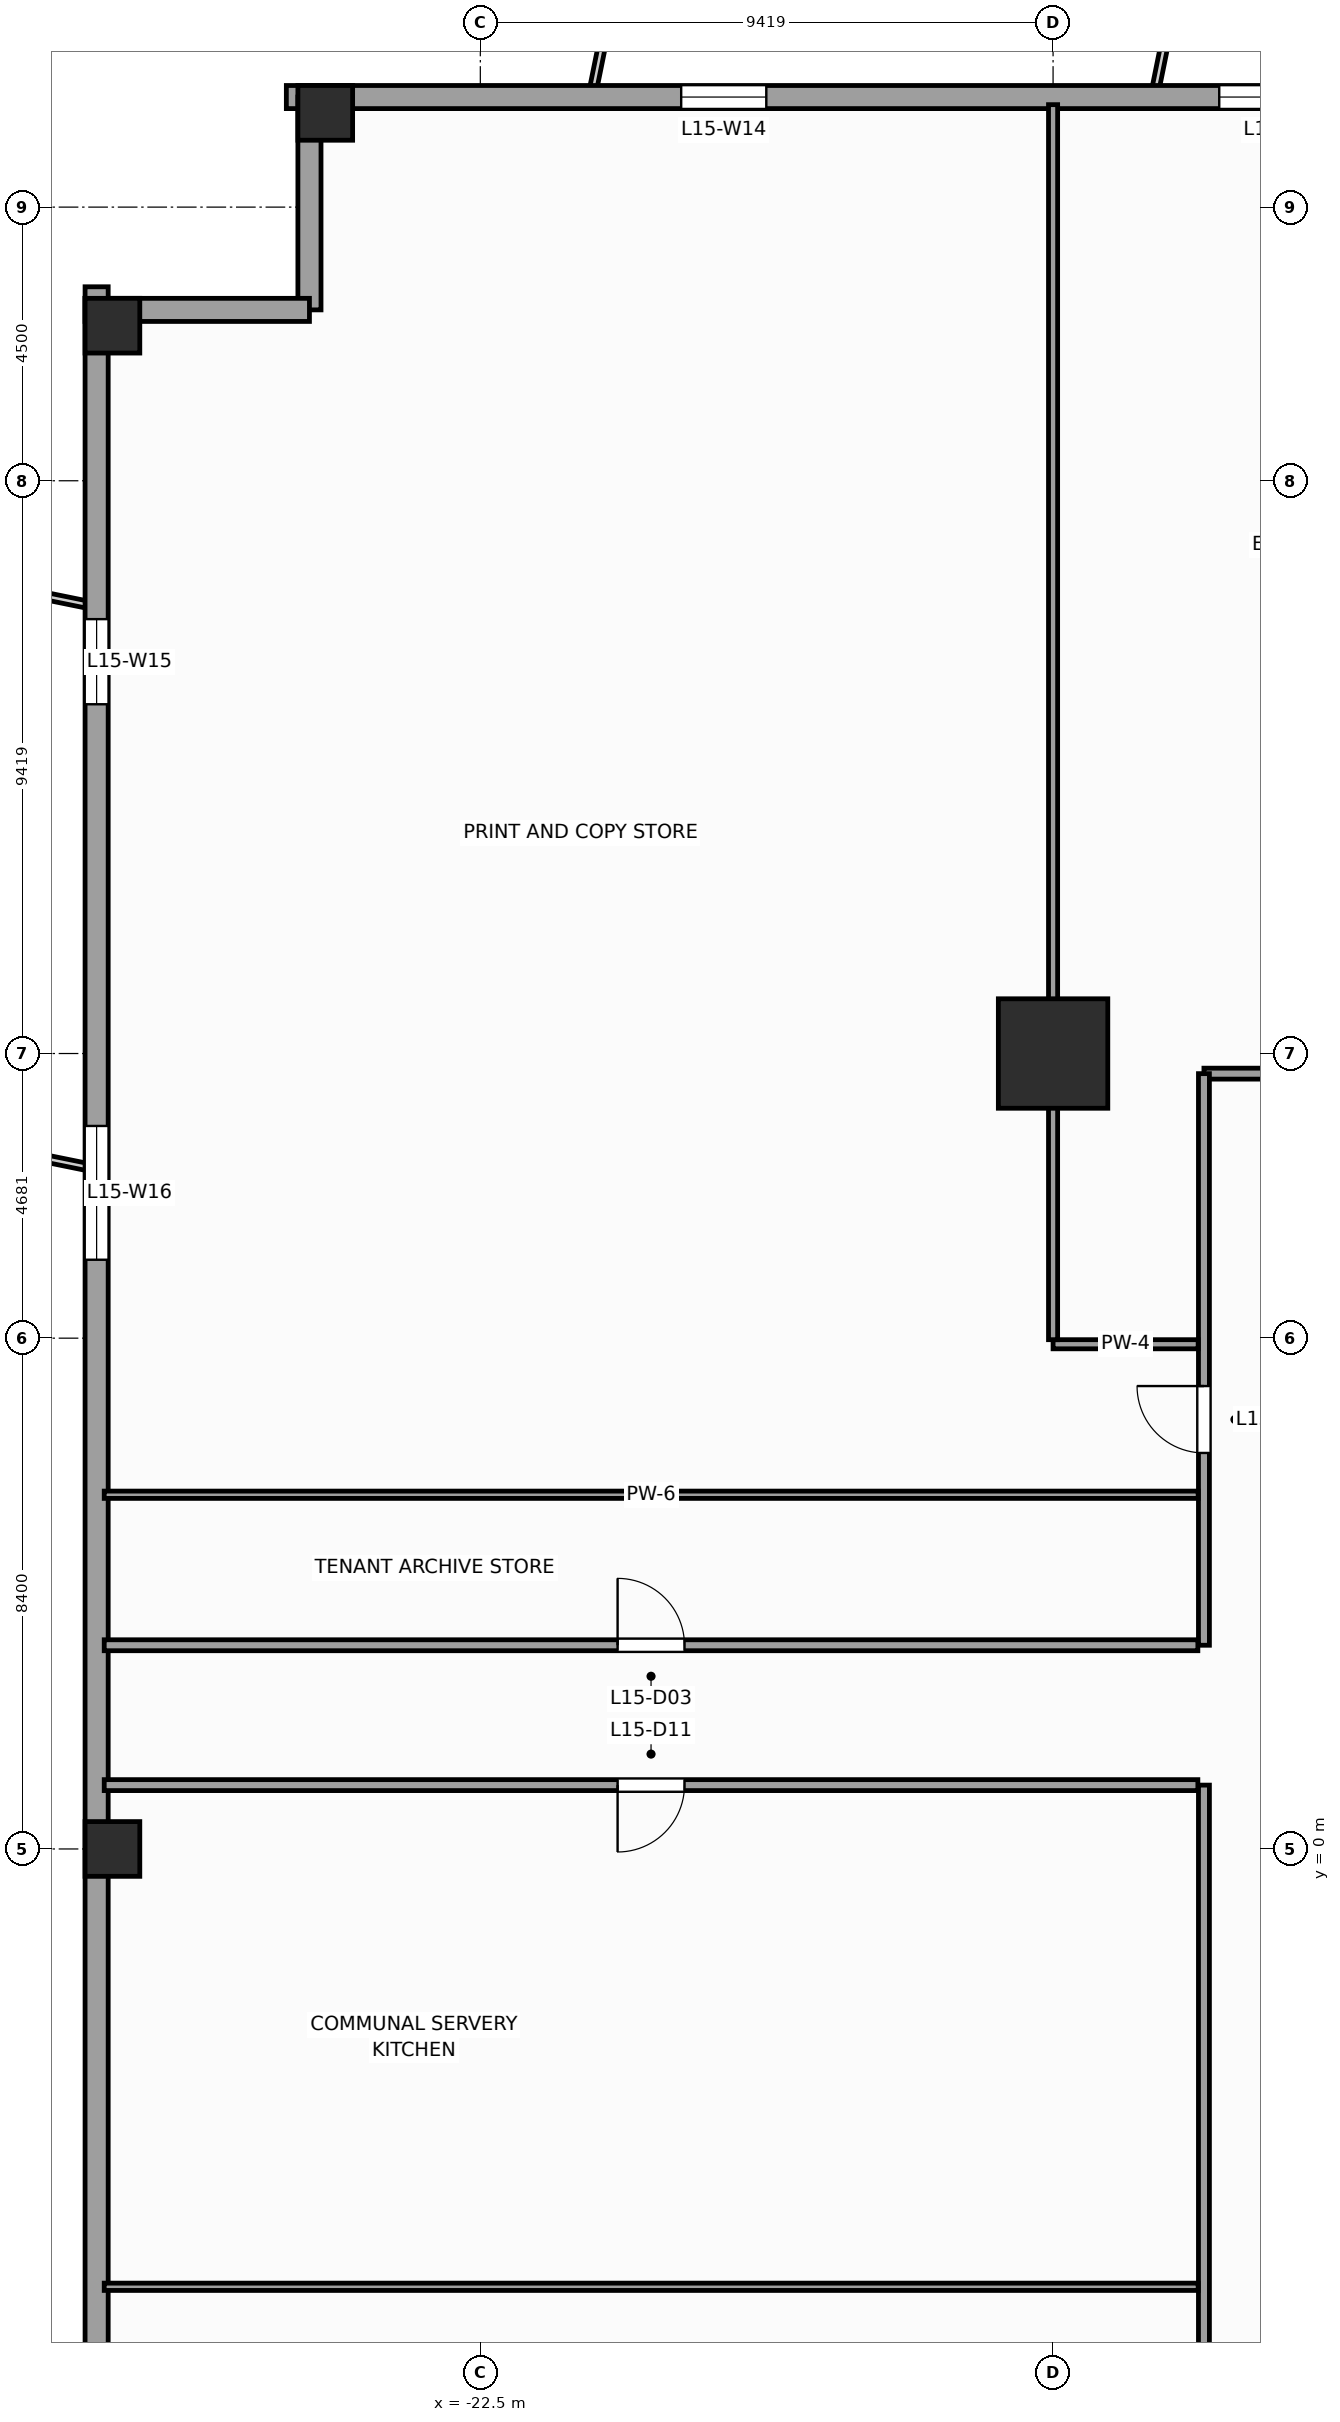
"""IFC4 building model, lengths in metres.
Left out: names, types, materials, properties, quantities, classifications, styles, units other than length and angle.
Written with IfcOpenShell. Run it as: python <this file> out.ifc"""

import sys

from ifc_helpers import new_model, si_unit, direction, frame, frame_2d, origin, origin_2d, place, context, subcontext, project, spatial, rectangle, extrude, source, transform, mapped, element, fill, save


model = new_model("IFC4")
c1 = context("Model", 3, precision=1e-05, world=origin(), true_north=direction((0.0, 1.0)))
c2 = subcontext(c1, "Body", "Model", "MODEL_VIEW")
j1 = project(units=[si_unit("LENGTHUNIT", "METRE"), si_unit("PLANEANGLEUNIT", "RADIAN")], contexts=[c1])
p1 = place(None, origin())
s1 = spatial("IfcSite", under=j1, at=p1, CompositionType="ELEMENT")
p2 = place(p1, origin())
s2 = spatial("IfcBuilding", under=s1, at=p2, CompositionType="ELEMENT")
p3 = place(p2, frame((0.0, 0.0, 66.0)))
s3 = spatial("IfcBuildingStorey", under=s2, at=p3, CompositionType="ELEMENT", Elevation=66.0)
m1 = source(origin(), c2, "Body", "SweptSolid", [
    extrude(rectangle(XDim=1.8, YDim=1.8, at=origin_2d()), origin(), (0.0, 0.0, 1.0), 4.0),
])
p4 = place(p3, frame((-13.081, 13.081, 0.0), z_axis=(0.0, 0.0, 1.0), x_axis=(1.0, 0.0, 0.0)))
e1 = element("IfcColumn", 1, at=p4, inside=s3, PredefinedType="COLUMN", context=c2, shape_type="MappedRepresentation", body=[
    mapped(m1, transform((0.0, 0.0, 0.0), scale=1.0)),
])
m2 = source(origin(), c2, "Body", "SweptSolid", [
    extrude(rectangle(XDim=0.9, YDim=0.9, at=origin_2d()), origin(), (0.0, 0.0, 1.0), 4.0),
])
for number, where, z_axis, x_axis in (
    (2, (-25.05, 28.55, 0.0), (0.0, 0.0, 1.0), (1.0, 0.0, 0.0)),
    (3, (-28.55, 25.05, 0.0), (0.0, 0.0, 1.0), (1.0, 0.0, 0.0)),
    (4, (-28.55, 0.0, 0.0), (0.0, 0.0, 1.0), (1.0, 0.0, 0.0)),
):
    element("IfcColumn", number, at=place(p3, frame(where, z_axis=z_axis, x_axis=x_axis)), inside=s3, PredefinedType="COLUMN", context=c2, shape_type="MappedRepresentation", body=[
        mapped(m2, transform((0.0, 0.0, 0.0), scale=1.0)),
    ])
p5 = place(p3, frame((25.69, 28.81, 0.0), z_axis=(0.0, 0.0, 1.0), x_axis=(-1.0, 0.0, 0.0)))
e5 = element("IfcWall", 5, at=p5, inside=s3, PredefinedType="STANDARD", context=c2, shape_type="SweptSolid", body=[
    extrude(rectangle(XDim=51.38, YDim=0.38, at=frame_2d((25.69, 0.0))), origin(), (0.0, 0.0, 1.0), 3.12),
])
p6 = place(p5, frame((18.715, 0.0, 0.0)))
e6 = element("IfcOpeningElement", 6, at=p6, cuts=e5, PredefinedType="OPENING", context=c2, shape_type="SweptSolid", body=[
    extrude(rectangle(XDim=1.05, YDim=2.25, at=frame_2d((0.525, 1.125))), frame((0.0, 0.2, 0.0), z_axis=(0.0, -1.0, 0.0), x_axis=(1.0, 0.0, 0.0)), (0.0, 0.0, 1.0), 0.4),
])
p7 = place(p5, frame((5.466, 0.0, 0.49)))
e7 = element("IfcOpeningElement", 7, at=p7, cuts=e5, PredefinedType="OPENING", context=c2, shape_type="SweptSolid", body=[
    extrude(rectangle(XDim=1.4, YDim=2.4, at=frame_2d((0.7, 1.2))), frame((0.0, 0.2, 0.0), z_axis=(0.0, -1.0, 0.0), x_axis=(1.0, 0.0, 0.0)), (0.0, 0.0, 1.0), 0.4),
])
p8 = place(p5, frame((13.8, 0.0, 0.49)))
e8 = element("IfcOpeningElement", 8, at=p8, cuts=e5, PredefinedType="OPENING", context=c2, shape_type="SweptSolid", body=[
    extrude(rectangle(XDim=2.2, YDim=2.4, at=frame_2d((1.1, 1.2))), frame((0.0, 0.2, 0.0), z_axis=(0.0, -1.0, 0.0), x_axis=(1.0, 0.0, 0.0)), (0.0, 0.0, 1.0), 0.4),
])
p9 = place(p5, frame((22.062, 0.0, 0.49)))
e9 = element("IfcOpeningElement", 9, at=p9, cuts=e5, PredefinedType="OPENING", context=c2, shape_type="SweptSolid", body=[
    extrude(rectangle(XDim=2.2, YDim=2.4, at=frame_2d((1.1, 1.2))), frame((0.0, 0.2, 0.0), z_axis=(0.0, -1.0, 0.0), x_axis=(1.0, 0.0, 0.0)), (0.0, 0.0, 1.0), 0.4),
])
p10 = place(p5, frame((33.838, 0.0, 0.49)))
e10 = element("IfcOpeningElement", 10, at=p10, cuts=e5, PredefinedType="OPENING", context=c2, shape_type="SweptSolid", body=[
    extrude(rectangle(XDim=2.2, YDim=2.4, at=frame_2d((1.1, 1.2))), frame((0.0, 0.2, 0.0), z_axis=(0.0, -1.0, 0.0), x_axis=(1.0, 0.0, 0.0)), (0.0, 0.0, 1.0), 0.4),
])
p11 = place(p5, frame((43.487, 0.0, 0.49)))
e11 = element("IfcOpeningElement", 11, at=p11, cuts=e5, PredefinedType="OPENING", context=c2, shape_type="SweptSolid", body=[
    extrude(rectangle(XDim=1.4, YDim=2.4, at=frame_2d((0.7, 1.2))), frame((0.0, 0.2, 0.0), z_axis=(0.0, -1.0, 0.0), x_axis=(1.0, 0.0, 0.0)), (0.0, 0.0, 1.0), 0.4),
])
p12 = place(p3, frame((-25.31, 28.81, 0.0), z_axis=(0.0, 0.0, 1.0), x_axis=(0.0, -1.0, 0.0)))
e12 = element("IfcWall", 12, at=p12, inside=s3, PredefinedType="STANDARD", context=c2, shape_type="SweptSolid", body=[
    extrude(rectangle(XDim=3.5, YDim=0.38, at=frame_2d((1.75, 0.0))), origin(), (0.0, 0.0, 1.0), 3.72),
])
p13 = place(p3, frame((-25.31, 25.31, 0.0), z_axis=(0.0, 0.0, 1.0), x_axis=(-1.0, 0.0, 0.0)))
e13 = element("IfcWall", 13, at=p13, inside=s3, PredefinedType="STANDARD", context=c2, shape_type="SweptSolid", body=[
    extrude(rectangle(XDim=3.69, YDim=0.38, at=frame_2d((1.845, 0.0))), origin(), (0.0, 0.0, 1.0), 3.72),
])
p14 = place(p3, frame((-28.81, 25.69, 0.0), z_axis=(0.0, 0.0, 1.0), x_axis=(0.0, -1.0, 0.0)))
e14 = element("IfcWall", 14, at=p14, inside=s3, PredefinedType="STANDARD", context=c2, shape_type="SweptSolid", body=[
    extrude(rectangle(XDim=51.38, YDim=0.38, at=frame_2d((25.69, 0.0))), origin(), (0.0, 0.0, 1.0), 3.12),
])
p15 = place(p14, frame((5.466, 0.0, 0.49)))
e15 = element("IfcOpeningElement", 15, at=p15, cuts=e14, PredefinedType="OPENING", context=c2, shape_type="SweptSolid", body=[
    extrude(rectangle(XDim=1.4, YDim=2.4, at=frame_2d((0.7, 1.2))), frame((0.0, 0.2, 0.0), z_axis=(0.0, -1.0, 0.0), x_axis=(1.0, 0.0, 0.0)), (0.0, 0.0, 1.0), 0.4),
])
p16 = place(p14, frame((13.8, 0.0, 0.49)))
e16 = element("IfcOpeningElement", 16, at=p16, cuts=e14, PredefinedType="OPENING", context=c2, shape_type="SweptSolid", body=[
    extrude(rectangle(XDim=2.2, YDim=2.4, at=frame_2d((1.1, 1.2))), frame((0.0, 0.2, 0.0), z_axis=(0.0, -1.0, 0.0), x_axis=(1.0, 0.0, 0.0)), (0.0, 0.0, 1.0), 0.4),
])
p17 = place(p14, frame((33.838, 0.0, 0.49)))
e17 = element("IfcOpeningElement", 17, at=p17, cuts=e14, PredefinedType="OPENING", context=c2, shape_type="SweptSolid", body=[
    extrude(rectangle(XDim=2.2, YDim=2.4, at=frame_2d((1.1, 1.2))), frame((0.0, 0.2, 0.0), z_axis=(0.0, -1.0, 0.0), x_axis=(1.0, 0.0, 0.0)), (0.0, 0.0, 1.0), 0.4),
])
p18 = place(p14, frame((43.487, 0.0, 0.49)))
e18 = element("IfcOpeningElement", 18, at=p18, cuts=e14, PredefinedType="OPENING", context=c2, shape_type="SweptSolid", body=[
    extrude(rectangle(XDim=1.4, YDim=2.4, at=frame_2d((0.7, 1.2))), frame((0.0, 0.2, 0.0), z_axis=(0.0, -1.0, 0.0), x_axis=(1.0, 0.0, 0.0)), (0.0, 0.0, 1.0), 0.4),
])
p19 = place(p3, frame((-10.6, 12.75, 0.0), z_axis=(0.0, 0.0, 1.0), x_axis=(1.0, 0.0, 0.0)))
e19 = element("IfcWall", 19, at=p19, inside=s3, PredefinedType="PARTITIONING", context=c2, shape_type="SweptSolid", body=[
    extrude(rectangle(XDim=21.2, YDim=0.18, at=frame_2d((10.6, 0.0))), origin(), (0.0, 0.0, 1.0), 3.72),
])
p20 = place(p19, frame((16.636, 0.0, 0.0)))
e20 = element("IfcOpeningElement", 20, at=p20, cuts=e19, PredefinedType="OPENING", context=c2, shape_type="SweptSolid", body=[
    extrude(rectangle(XDim=0.95, YDim=2.1, at=frame_2d((0.475, 1.05))), frame((0.0, 0.1, 0.0), z_axis=(0.0, -1.0, 0.0), x_axis=(1.0, 0.0, 0.0)), (0.0, 0.0, 1.0), 0.2),
])
p21 = place(p19, frame((3.314, 0.0, 0.0)))
e21 = element("IfcOpeningElement", 21, at=p21, cuts=e19, PredefinedType="OPENING", context=c2, shape_type="SweptSolid", body=[
    extrude(rectangle(XDim=1.1, YDim=2.2, at=frame_2d((0.55, 1.1))), frame((0.0, 0.1, 0.0), z_axis=(0.0, -1.0, 0.0), x_axis=(1.0, 0.0, 0.0)), (0.0, 0.0, 1.0), 0.2),
])
p22 = place(p19, frame((11.05, 0.0, 0.0)))
e22 = element("IfcOpeningElement", 22, at=p22, cuts=e19, PredefinedType="OPENING", context=c2, shape_type="SweptSolid", body=[
    extrude(rectangle(XDim=1.1, YDim=2.2, at=frame_2d((0.55, 1.1))), frame((0.0, 0.1, 0.0), z_axis=(0.0, -1.0, 0.0), x_axis=(1.0, 0.0, 0.0)), (0.0, 0.0, 1.0), 0.2),
])
p23 = place(p3, frame((-10.6, -11.7, 0.0), z_axis=(0.0, 0.0, 1.0), x_axis=(0.0, 1.0, 0.0)))
e23 = element("IfcWall", 23, at=p23, inside=s3, PredefinedType="PARTITIONING", context=c2, shape_type="SweptSolid", body=[
    extrude(rectangle(XDim=12.75, YDim=0.18, at=frame_2d((6.375, 0.0))), origin(), (0.0, 0.0, 1.0), 3.72),
])
p24 = place(p3, frame((-10.6, 3.35, 0.0), z_axis=(0.0, 0.0, 1.0), x_axis=(0.0, 1.0, 0.0)))
e24 = element("IfcWall", 24, at=p24, inside=s3, PredefinedType="PARTITIONING", context=c2, shape_type="SweptSolid", body=[
    extrude(rectangle(XDim=9.4, YDim=0.18, at=frame_2d((4.7, 0.0))), origin(), (0.0, 0.0, 1.0), 3.72),
])
p25 = place(p24, frame((3.163, 0.0, 0.0)))
e25 = element("IfcOpeningElement", 25, at=p25, cuts=e24, PredefinedType="OPENING", context=c2, shape_type="SweptSolid", body=[
    extrude(rectangle(XDim=1.1, YDim=2.2, at=frame_2d((0.55, 1.1))), frame((0.0, 0.1, 0.0), z_axis=(0.0, -1.0, 0.0), x_axis=(1.0, 0.0, 0.0)), (0.0, 0.0, 1.0), 0.2),
])
p26 = place(p3, frame((-28.685, 1.05, 0.0), z_axis=(0.0, 0.0, 1.0), x_axis=(1.0, 0.0, 0.0)))
e26 = element("IfcWall", 26, at=p26, inside=s3, PredefinedType="PARTITIONING", context=c2, shape_type="SweptSolid", body=[
    extrude(rectangle(XDim=17.985, YDim=0.18, at=frame_2d((8.993, 0.0))), origin(), (0.0, 0.0, 1.0), 3.72),
])
p27 = place(p26, frame((8.442, 0.0, 0.0)))
e27 = element("IfcOpeningElement", 27, at=p27, cuts=e26, PredefinedType="OPENING", context=c2, shape_type="SweptSolid", body=[
    extrude(rectangle(XDim=1.1, YDim=2.2, at=frame_2d((0.55, 1.1))), frame((0.0, 0.1, 0.0), z_axis=(0.0, -1.0, 0.0), x_axis=(1.0, 0.0, 0.0)), (0.0, 0.0, 1.0), 0.2),
])
p28 = place(p3, frame((-28.685, 3.35, 0.0), z_axis=(0.0, 0.0, 1.0), x_axis=(1.0, 0.0, 0.0)))
e28 = element("IfcWall", 28, at=p28, inside=s3, PredefinedType="PARTITIONING", context=c2, shape_type="SweptSolid", body=[
    extrude(rectangle(XDim=17.985, YDim=0.18, at=frame_2d((8.993, 0.0))), origin(), (0.0, 0.0, 1.0), 3.72),
])
p29 = place(p28, frame((8.442, 0.0, 0.0)))
e29 = element("IfcOpeningElement", 29, at=p29, cuts=e28, PredefinedType="OPENING", context=c2, shape_type="SweptSolid", body=[
    extrude(rectangle(XDim=1.1, YDim=2.2, at=frame_2d((0.55, 1.1))), frame((0.0, 0.1, 0.0), z_axis=(0.0, -1.0, 0.0), x_axis=(1.0, 0.0, 0.0)), (0.0, 0.0, 1.0), 0.2),
])
p30 = place(p3, frame((-10.695, 8.3, 0.0), z_axis=(0.0, 0.0, 1.0), x_axis=(-1.0, 0.0, 0.0)))
e30 = element("IfcWall", 30, at=p30, inside=s3, PredefinedType="PARTITIONING", context=c2, shape_type="SweptSolid", body=[
    extrude(rectangle(XDim=2.386, YDim=0.15, at=frame_2d((1.193, 0.0))), origin(), (0.0, 0.0, 1.0), 3.72),
])
p31 = place(p3, frame((-13.081, 8.375, 0.0), z_axis=(0.0, 0.0, 1.0), x_axis=(0.0, 1.0, 0.0)))
e31 = element("IfcWall", 31, at=p31, inside=s3, PredefinedType="PARTITIONING", context=c2, shape_type="SweptSolid", body=[
    extrude(rectangle(XDim=20.31, YDim=0.15, at=frame_2d((10.155, 0.0))), origin(), (0.0, 0.0, 1.0), 2.712),
])
for number, where, z_axis, x_axis in (
    (32, (-28.685, 5.825, 0.0), (0.0, 0.0, 1.0), (1.0, 0.0, 0.0)),
    (33, (-28.685, -7.2, 0.0), (0.0, 0.0, 1.0), (1.0, 0.0, 0.0)),
):
    element("IfcWall", number, at=place(p3, frame(where, z_axis=z_axis, x_axis=x_axis)), inside=s3, PredefinedType="PARTITIONING", context=c2, shape_type="SweptSolid", body=[
        extrude(rectangle(XDim=17.99, YDim=0.12, at=frame_2d((8.995, 0.0))), origin(), (0.0, 0.0, 1.0), 3.72),
    ])
m3 = source(origin(), c2, "Body", "SweptSolid", [
    extrude(rectangle(XDim=2.2, YDim=2.4, at=frame_2d((1.1, 1.2))), frame((0.0, 0.03, 0.0), z_axis=(0.0, -1.0, 0.0), x_axis=(1.0, 0.0, 0.0)), (0.0, 0.0, 1.0), 0.06),
])
p32 = place(p10, origin())
e34 = element("IfcWindow", 34, at=p32, inside=s3, PartitioningType="SINGLE_PANEL", PredefinedType="WINDOW", context=c2, shape_type="MappedRepresentation", body=[
    mapped(m3, transform((0.0, 0.0, 0.0), scale=1.0)),
])
fill(e10, e34)
m4 = source(origin(), c2, "Body", "SweptSolid", [
    extrude(rectangle(XDim=1.4, YDim=2.4, at=frame_2d((0.7, 1.2))), frame((0.0, 0.03, 0.0), z_axis=(0.0, -1.0, 0.0), x_axis=(1.0, 0.0, 0.0)), (0.0, 0.0, 1.0), 0.06),
])
p33 = place(p11, origin())
e35 = element("IfcWindow", 35, at=p33, inside=s3, PartitioningType="SINGLE_PANEL", PredefinedType="WINDOW", context=c2, shape_type="MappedRepresentation", body=[
    mapped(m4, transform((0.0, 0.0, 0.0), scale=1.0)),
])
fill(e11, e35)
p34 = place(p15, origin())
e36 = element("IfcWindow", 36, at=p34, inside=s3, PartitioningType="SINGLE_PANEL", PredefinedType="WINDOW", context=c2, shape_type="MappedRepresentation", body=[
    mapped(m4, transform((0.0, 0.0, 0.0), scale=1.0)),
])
fill(e15, e36)
p35 = place(p16, origin())
e37 = element("IfcWindow", 37, at=p35, inside=s3, PartitioningType="SINGLE_PANEL", PredefinedType="WINDOW", context=c2, shape_type="MappedRepresentation", body=[
    mapped(m3, transform((0.0, 0.0, 0.0), scale=1.0)),
])
fill(e16, e37)
m5 = source(origin(), c2, "Body", "SweptSolid", [
    extrude(rectangle(XDim=1.1, YDim=2.2, at=frame_2d((0.55, 1.1))), frame((0.0, 0.025, 0.0), z_axis=(0.0, -1.0, 0.0), x_axis=(1.0, 0.0, 0.0)), (0.0, 0.0, 1.0), 0.05),
])
p36 = place(p29, origin())
e38 = element("IfcDoor", 38, at=p36, inside=s3, OperationType="SINGLE_SWING_LEFT", PredefinedType="DOOR", context=c2, shape_type="MappedRepresentation", body=[
    mapped(m5, transform((0.0, 0.0, 0.0), scale=1.0)),
])
fill(e29, e38)
p37 = place(p25, origin())
e39 = element("IfcDoor", 39, at=p37, inside=s3, OperationType="SINGLE_SWING_RIGHT", PredefinedType="DOOR", context=c2, shape_type="MappedRepresentation", body=[
    mapped(m5, transform((0.0, 0.0, 0.0), scale=1.0)),
])
fill(e25, e39)
p38 = place(p27, frame((1.1, 0.0, 0.0), z_axis=(0.0, 0.0, 1.0), x_axis=(-1.0, 0.0, 0.0)))
e40 = element("IfcDoor", 40, at=p38, inside=s3, OperationType="SINGLE_SWING_LEFT", PredefinedType="DOOR", context=c2, shape_type="MappedRepresentation", body=[
    mapped(m5, transform((0.0, 0.0, 0.0), scale=1.0)),
])
fill(e27, e40)
save(model, sys.argv[1])
